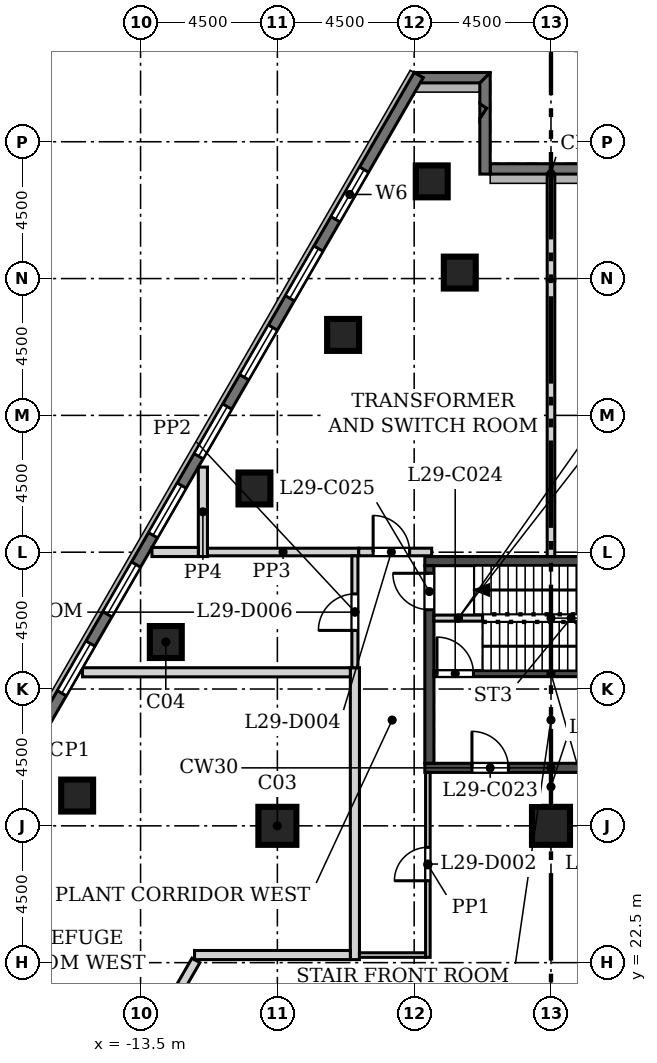
"""IFC4 building model, lengths in metres.
Left out: names, types, materials, properties, quantities, classifications, styles, units other than length and angle.
Written with IfcOpenShell. Run it as: python <this file> out.ifc"""

import sys

from ifc_helpers import new_model, si_unit, direction, frame, frame_2d, origin, origin_2d, place, context, subcontext, project, spatial, polyline, rectangle, outline, extrude, element, fill, save


model = new_model("IFC4")
c1 = context("Model", 3, precision=1e-05, world=origin(), true_north=direction((0.0, 1.0)))
c2 = subcontext(c1, "Body", "Model", "MODEL_VIEW")
j1 = project(units=[si_unit("LENGTHUNIT", "METRE"), si_unit("PLANEANGLEUNIT", "RADIAN")], contexts=[c1])
p1 = place(None, origin())
s1 = spatial("IfcSite", under=j1, at=p1, CompositionType="ELEMENT")
p2 = place(p1, origin())
s2 = spatial("IfcBuilding", under=s1, at=p2, CompositionType="ELEMENT")
p3 = place(p2, frame((0.0, 0.0, 132.1)))
s3 = spatial("IfcBuildingStorey", under=s2, at=p3, CompositionType="ELEMENT", Elevation=132.1)
for number, where, z_axis, x_axis in (
    (1, (-3.0, 45.197, 0.0), (0.0, 0.0, 1.0), (1.0, 0.0, 0.0)),
    (2, (-3.923, 48.197, 0.0), (0.0, 0.0, 1.0), (1.0, 0.0, 0.0)),
    (3, (-6.838, 43.146, 0.0), (0.0, 0.0, 1.0), (1.0, 0.0, 0.0)),
    (4, (-9.754, 38.096, 0.0), (0.0, 0.0, 1.0), (1.0, 0.0, 0.0)),
    (5, (-12.67, 33.046, 0.0), (0.0, 0.0, 1.0), (1.0, 0.0, 0.0)),
    (6, (-15.586, 27.995, 0.0), (0.0, 0.0, 1.0), (1.0, 0.0, 0.0)),
):
    element("IfcColumn", number, at=place(p3, frame(where, z_axis=z_axis, x_axis=x_axis)), inside=s3, PredefinedType="COLUMN", context=c2, shape_type="SweptSolid", body=[
        extrude(rectangle(XDim=1.05, YDim=1.05, at=origin_2d()), origin(), (0.0, 0.0, 1.0), 5.4),
    ])
for number, where, z_axis, x_axis in (
    (7, (-9.0, 27.0, 0.0), (0.0, 0.0, 1.0), (1.0, 0.0, 0.0)),
    (8, (0.0, 27.0, 0.0), (0.0, 0.0, 1.0), (1.0, 0.0, 0.0)),
):
    element("IfcColumn", number, at=place(p3, frame(where, z_axis=z_axis, x_axis=x_axis)), inside=s3, PredefinedType="COLUMN", context=c2, shape_type="SweptSolid", body=[
        extrude(rectangle(XDim=1.25, YDim=1.25, at=origin_2d()), origin(), (0.0, 0.0, 1.0), 5.4),
    ])
p4 = place(p3, frame((2.0, 48.607, 0.0), z_axis=(0.0, 0.0, 1.0), x_axis=(-1.0, 0.0, 0.0)))
e9 = element("IfcWall", 9, at=p4, inside=s3, PredefinedType="SOLIDWALL", context=c2, shape_type="SweptSolid", body=[
    extrude(rectangle(XDim=4.0, YDim=0.34, at=frame_2d((2.0, 0.0))), origin(), (0.0, 0.0, 1.0), 5.0),
])
p5 = place(p3, origin())
e10 = element("IfcWall", 10, at=p5, inside=s3, PredefinedType="SOLIDWALL", context=c2, shape_type="SweptSolid", body=[
    extrude(outline(polyline([(-2.341, 50.752), (-2.114, 50.604), (-2.341, 50.256), (-2.341, 50.752)])), origin(), (0.0, 0.0, 1.0), 4.4),
])
p6 = place(p3, origin())
e11 = element("IfcWall", 11, at=p6, inside=s3, PredefinedType="SOLIDWALL", context=c2, shape_type="SweptSolid", body=[
    extrude(outline(polyline([(-2.0, 48.436), (-2.341, 48.436), (-2.341, 50.256), (-2.114, 50.604), (-2.341, 50.752), (-2.341, 51.437), (-2.0, 51.778), (-2.0, 51.778), (-2.0, 48.436)])), origin(), (0.0, 0.0, 1.0), 5.0),
])
p7 = place(p3, origin())
e12 = element("IfcWall", 12, at=p7, inside=s3, PredefinedType="SOLIDWALL", context=c2, shape_type="SweptSolid", body=[
    extrude(outline(polyline([(-4.305, 51.436), (-4.206, 51.606), (-4.501, 51.777), (-4.501, 51.777), (-1.999, 51.777), (-1.999, 51.777), (-2.34, 51.436), (-4.305, 51.436)])), origin(), (0.0, 0.0, 1.0), 5.0),
])
p8 = place(p3, frame((-4.353, 51.692, 0.0), z_axis=(0.0, 0.0, 1.0), x_axis=(-0.500000700546, -0.866024999324, 0.0)))
e13 = element("IfcWall", 13, at=p8, inside=s3, PredefinedType="SOLIDWALL", context=c2, shape_type="SweptSolid", body=[
    extrude(rectangle(XDim=50.787, YDim=0.34, at=frame_2d((25.393, 0.0))), origin(), (0.0, 0.0, 1.0), 5.0),
])
p9 = place(p8, frame((3.59, 0.0, 0.9)))
e14 = element("IfcOpeningElement", 14, at=p9, cuts=e13, PredefinedType="OPENING", context=c2, shape_type="SweptSolid", body=[
    extrude(rectangle(XDim=1.885, YDim=3.0, at=frame_2d((0.942, 1.5))), frame((0.0, 0.18, 0.0), z_axis=(0.0, -1.0, 0.0), x_axis=(1.0, 0.0, 0.0)), (0.0, 0.0, 1.0), 0.36),
])
p10 = place(p8, frame((6.59, 0.0, 0.9)))
e15 = element("IfcOpeningElement", 15, at=p10, cuts=e13, PredefinedType="OPENING", context=c2, shape_type="SweptSolid", body=[
    extrude(rectangle(XDim=1.885, YDim=3.0, at=frame_2d((0.942, 1.5))), frame((0.0, 0.18, 0.0), z_axis=(0.0, -1.0, 0.0), x_axis=(1.0, 0.0, 0.0)), (0.0, 0.0, 1.0), 0.36),
])
p11 = place(p8, frame((9.59, 0.0, 0.9)))
e16 = element("IfcOpeningElement", 16, at=p11, cuts=e13, PredefinedType="OPENING", context=c2, shape_type="SweptSolid", body=[
    extrude(rectangle(XDim=1.885, YDim=3.0, at=frame_2d((0.942, 1.5))), frame((0.0, 0.18, 0.0), z_axis=(0.0, -1.0, 0.0), x_axis=(1.0, 0.0, 0.0)), (0.0, 0.0, 1.0), 0.36),
])
p12 = place(p8, frame((12.59, 0.0, 0.9)))
e17 = element("IfcOpeningElement", 17, at=p12, cuts=e13, PredefinedType="OPENING", context=c2, shape_type="SweptSolid", body=[
    extrude(rectangle(XDim=1.885, YDim=3.0, at=frame_2d((0.942, 1.5))), frame((0.0, 0.18, 0.0), z_axis=(0.0, -1.0, 0.0), x_axis=(1.0, 0.0, 0.0)), (0.0, 0.0, 1.0), 0.36),
])
p13 = place(p8, frame((15.59, 0.0, 0.9)))
e18 = element("IfcOpeningElement", 18, at=p13, cuts=e13, PredefinedType="OPENING", context=c2, shape_type="SweptSolid", body=[
    extrude(rectangle(XDim=1.885, YDim=3.0, at=frame_2d((0.942, 1.5))), frame((0.0, 0.18, 0.0), z_axis=(0.0, -1.0, 0.0), x_axis=(1.0, 0.0, 0.0)), (0.0, 0.0, 1.0), 0.36),
])
p14 = place(p8, frame((18.59, 0.0, 0.9)))
e19 = element("IfcOpeningElement", 19, at=p14, cuts=e13, PredefinedType="OPENING", context=c2, shape_type="SweptSolid", body=[
    extrude(rectangle(XDim=1.885, YDim=3.0, at=frame_2d((0.942, 1.5))), frame((0.0, 0.18, 0.0), z_axis=(0.0, -1.0, 0.0), x_axis=(1.0, 0.0, 0.0)), (0.0, 0.0, 1.0), 0.36),
])
p15 = place(p8, frame((21.59, 0.0, 0.9)))
e20 = element("IfcOpeningElement", 20, at=p15, cuts=e13, PredefinedType="OPENING", context=c2, shape_type="SweptSolid", body=[
    extrude(rectangle(XDim=1.885, YDim=3.0, at=frame_2d((0.942, 1.5))), frame((0.0, 0.18, 0.0), z_axis=(0.0, -1.0, 0.0), x_axis=(1.0, 0.0, 0.0)), (0.0, 0.0, 1.0), 0.36),
])
p16 = place(p8, frame((24.59, 0.0, 0.9)))
e21 = element("IfcOpeningElement", 21, at=p16, cuts=e13, PredefinedType="OPENING", context=c2, shape_type="SweptSolid", body=[
    extrude(rectangle(XDim=1.885, YDim=3.0, at=frame_2d((0.942, 1.5))), frame((0.0, 0.18, 0.0), z_axis=(0.0, -1.0, 0.0), x_axis=(1.0, 0.0, 0.0)), (0.0, 0.0, 1.0), 0.36),
])
p17 = place(p8, frame((27.59, 0.0, 0.9)))
e22 = element("IfcOpeningElement", 22, at=p17, cuts=e13, PredefinedType="OPENING", context=c2, shape_type="SweptSolid", body=[
    extrude(rectangle(XDim=1.885, YDim=3.0, at=frame_2d((0.942, 1.5))), frame((0.0, 0.18, 0.0), z_axis=(0.0, -1.0, 0.0), x_axis=(1.0, 0.0, 0.0)), (0.0, 0.0, 1.0), 0.36),
])
p18 = place(p8, frame((30.59, 0.0, 0.9)))
e23 = element("IfcOpeningElement", 23, at=p18, cuts=e13, PredefinedType="OPENING", context=c2, shape_type="SweptSolid", body=[
    extrude(rectangle(XDim=1.885, YDim=3.0, at=frame_2d((0.942, 1.5))), frame((0.0, 0.18, 0.0), z_axis=(0.0, -1.0, 0.0), x_axis=(1.0, 0.0, 0.0)), (0.0, 0.0, 1.0), 0.36),
])
p19 = place(p8, frame((33.59, 0.0, 0.9)))
e24 = element("IfcOpeningElement", 24, at=p19, cuts=e13, PredefinedType="OPENING", context=c2, shape_type="SweptSolid", body=[
    extrude(rectangle(XDim=1.885, YDim=3.0, at=frame_2d((0.942, 1.5))), frame((0.0, 0.18, 0.0), z_axis=(0.0, -1.0, 0.0), x_axis=(1.0, 0.0, 0.0)), (0.0, 0.0, 1.0), 0.36),
])
p20 = place(p8, frame((36.59, 0.0, 0.9)))
e25 = element("IfcOpeningElement", 25, at=p20, cuts=e13, PredefinedType="OPENING", context=c2, shape_type="SweptSolid", body=[
    extrude(rectangle(XDim=1.885, YDim=3.0, at=frame_2d((0.942, 1.5))), frame((0.0, 0.18, 0.0), z_axis=(0.0, -1.0, 0.0), x_axis=(1.0, 0.0, 0.0)), (0.0, 0.0, 1.0), 0.36),
])
p21 = place(p8, frame((39.59, 0.0, 0.9)))
e26 = element("IfcOpeningElement", 26, at=p21, cuts=e13, PredefinedType="OPENING", context=c2, shape_type="SweptSolid", body=[
    extrude(rectangle(XDim=1.885, YDim=3.0, at=frame_2d((0.942, 1.5))), frame((0.0, 0.18, 0.0), z_axis=(0.0, -1.0, 0.0), x_axis=(1.0, 0.0, 0.0)), (0.0, 0.0, 1.0), 0.36),
])
p22 = place(p8, frame((42.59, 0.0, 0.9)))
e27 = element("IfcOpeningElement", 27, at=p22, cuts=e13, PredefinedType="OPENING", context=c2, shape_type="SweptSolid", body=[
    extrude(rectangle(XDim=1.885, YDim=3.0, at=frame_2d((0.942, 1.5))), frame((0.0, 0.18, 0.0), z_axis=(0.0, -1.0, 0.0), x_axis=(1.0, 0.0, 0.0)), (0.0, 0.0, 1.0), 0.36),
])
p23 = place(p8, frame((45.59, 0.0, 0.9)))
e28 = element("IfcOpeningElement", 28, at=p23, cuts=e13, PredefinedType="OPENING", context=c2, shape_type="SweptSolid", body=[
    extrude(rectangle(XDim=1.885, YDim=3.0, at=frame_2d((0.942, 1.5))), frame((0.0, 0.18, 0.0), z_axis=(0.0, -1.0, 0.0), x_axis=(1.0, 0.0, 0.0)), (0.0, 0.0, 1.0), 0.36),
])
p24 = place(p3, frame((-4.15, 28.907, -0.4), z_axis=(0.0, 0.0, 1.0), x_axis=(1.0, 0.0, 0.0)))
e29 = element("IfcWall", 29, at=p24, inside=s3, PredefinedType="SOLIDWALL", context=c2, shape_type="SweptSolid", body=[
    extrude(rectangle(XDim=8.3, YDim=0.3, at=frame_2d((4.15, 0.0))), origin(), (0.0, 0.0, 1.0), 5.4),
])
p25 = place(p24, frame((1.55, 0.0, 0.4)))
e30 = element("IfcOpeningElement", 30, at=p25, cuts=e29, PredefinedType="OPENING", context=c2, shape_type="SweptSolid", body=[
    extrude(rectangle(XDim=1.2, YDim=2.1, at=frame_2d((0.6, 1.05))), frame((0.0, 0.16, 0.0), z_axis=(0.0, -1.0, 0.0), x_axis=(1.0, 0.0, 0.0)), (0.0, 0.0, 1.0), 0.32),
])
p26 = place(p3, frame((-4.15, 35.707, -0.4), z_axis=(0.0, 0.0, 1.0), x_axis=(1.0, 0.0, 0.0)))
e31 = element("IfcWall", 31, at=p26, inside=s3, PredefinedType="SOLIDWALL", context=c2, shape_type="SweptSolid", body=[
    extrude(rectangle(XDim=8.3, YDim=0.3, at=frame_2d((4.15, 0.0))), origin(), (0.0, 0.0, 1.0), 5.4),
])
p27 = place(p3, frame((-4.0, 29.057, -0.4), z_axis=(0.0, 0.0, 1.0), x_axis=(0.0, 1.0, 0.0)))
e32 = element("IfcWall", 32, at=p27, inside=s3, PredefinedType="SOLIDWALL", context=c2, shape_type="SweptSolid", body=[
    extrude(rectangle(XDim=6.5, YDim=0.3, at=frame_2d((3.25, 0.0))), origin(), (0.0, 0.0, 1.0), 5.4),
])
p28 = place(p27, frame((5.05, 0.0, 0.4)))
e33 = element("IfcOpeningElement", 33, at=p28, cuts=e32, PredefinedType="OPENING", context=c2, shape_type="SweptSolid", body=[
    extrude(rectangle(XDim=1.2, YDim=2.1, at=frame_2d((0.6, 1.05))), frame((0.0, 0.16, 0.0), z_axis=(0.0, -1.0, 0.0), x_axis=(1.0, 0.0, 0.0)), (0.0, 0.0, 1.0), 0.32),
])
p29 = place(p3, frame((-3.85, 32.007, -0.4), z_axis=(0.0, 0.0, 1.0), x_axis=(1.0, 0.0, 0.0)))
e34 = element("IfcWall", 34, at=p29, inside=s3, PredefinedType="SOLIDWALL", context=c2, shape_type="SweptSolid", body=[
    extrude(rectangle(XDim=7.7, YDim=0.2, at=frame_2d((3.85, 0.0))), origin(), (0.0, 0.0, 1.0), 5.4),
])
p30 = place(p29, frame((0.1, 0.0, 0.4)))
e35 = element("IfcOpeningElement", 35, at=p30, cuts=e34, PredefinedType="OPENING", context=c2, shape_type="SweptSolid", body=[
    extrude(rectangle(XDim=1.2, YDim=2.1, at=frame_2d((0.6, 1.05))), frame((0.0, 0.11, 0.0), z_axis=(0.0, -1.0, 0.0), x_axis=(1.0, 0.0, 0.0)), (0.0, 0.0, 1.0), 0.22),
])
p31 = place(p3, frame((-3.85, 33.832, 0.0), z_axis=(0.0, 0.0, 1.0), x_axis=(1.0, 0.0, 0.0)))
e36 = element("IfcWall", 36, at=p31, inside=s3, PredefinedType="SOLIDWALL", context=c2, shape_type="SweptSolid", body=[
    extrude(rectangle(XDim=1.6, YDim=0.2, at=frame_2d((0.8, 0.0))), origin(), (0.0, 0.0, 1.0), 5.0),
])
p32 = place(p3, frame((0.0, 48.437, 0.0), z_axis=(0.0, 0.0, 1.0), x_axis=(0.0, -1.0, 0.0)))
e37 = element("IfcWall", 37, at=p32, inside=s3, PredefinedType="SOLIDWALL", context=c2, shape_type="SweptSolid", body=[
    extrude(rectangle(XDim=3.49, YDim=0.25, at=frame_2d((1.745, 0.0))), origin(), (0.0, 0.0, 1.0), 5.0),
])
p33 = place(p3, frame((-17.626, 12.272, 0.0), z_axis=(0.0, 0.0, 1.0), x_axis=(0.500008476462, 0.866020509841, 0.0)))
e38 = element("IfcWall", 38, at=p33, inside=s3, PredefinedType="SOLIDWALL", context=c2, shape_type="SweptSolid", body=[
    extrude(rectangle(XDim=11.896, YDim=0.3, at=frame_2d((5.948, 0.0))), origin(), (0.0, 0.0, 1.0), 5.0),
])
p34 = place(p3, frame((-6.45, 22.6, 0.0), z_axis=(0.0, 0.0, 1.0), x_axis=(0.0, 1.0, 0.0)))
e39 = element("IfcWall", 39, at=p34, inside=s3, PredefinedType="SOLIDWALL", context=c2, shape_type="SweptSolid", body=[
    extrude(rectangle(XDim=9.6, YDim=0.3, at=frame_2d((4.8, 0.0))), origin(), (0.0, 0.0, 1.0), 5.0),
])
p35 = place(p3, frame((-15.41, 32.05, 0.0), z_axis=(0.0, 0.0, 1.0), x_axis=(1.0, 0.0, 0.0)))
e40 = element("IfcWall", 40, at=p35, inside=s3, PredefinedType="SOLIDWALL", context=c2, shape_type="SweptSolid", body=[
    extrude(rectangle(XDim=8.81, YDim=0.3, at=frame_2d((4.405, 0.0))), origin(), (0.0, 0.0, 1.0), 5.0),
])
p36 = place(p3, frame((-4.05, 22.675, 0.0), z_axis=(0.0, 0.0, 1.0), x_axis=(0.0, 1.0, 0.0)))
e41 = element("IfcWall", 41, at=p36, inside=s3, PredefinedType="PARTITIONING", context=c2, shape_type="SweptSolid", body=[
    extrude(rectangle(XDim=6.082, YDim=0.15, at=frame_2d((3.041, 0.0))), origin(), (0.0, 0.0, 1.0), 5.0),
])
p37 = place(p36, frame((2.519, 0.0, 0.0)))
e42 = element("IfcOpeningElement", 42, at=p37, cuts=e41, PredefinedType="OPENING", context=c2, shape_type="SweptSolid", body=[
    extrude(rectangle(XDim=1.1, YDim=2.1, at=frame_2d((0.55, 1.05))), frame((0.0, 0.085, 0.0), z_axis=(0.0, -1.0, 0.0), x_axis=(1.0, 0.0, 0.0)), (0.0, 0.0, 1.0), 0.17),
])
p38 = place(p3, frame((-11.725, 22.75, 0.0), z_axis=(0.0, 0.0, 1.0), x_axis=(1.0, 0.0, 0.0)))
e43 = element("IfcWall", 43, at=p38, inside=s3, PredefinedType="SOLIDWALL", context=c2, shape_type="SweptSolid", body=[
    extrude(rectangle(XDim=5.125, YDim=0.3, at=frame_2d((2.562, 0.0))), origin(), (0.0, 0.0, 1.0), 5.0),
])
p39 = place(p3, frame((-6.325, 36.006, 0.0), z_axis=(0.0, 0.0, 1.0), x_axis=(-1.0, 0.0, 0.0)))
e44 = element("IfcWall", 44, at=p39, inside=s3, PredefinedType="SOLIDWALL", context=c2, shape_type="SweptSolid", body=[
    extrude(rectangle(XDim=4.975, YDim=0.25, at=frame_2d((2.488, 0.0))), origin(), (0.0, 0.0, 1.0), 4.1),
])
p40 = place(p3, frame((-6.45, 32.2, 0.0), z_axis=(0.0, 0.0, 1.0), x_axis=(0.0, 1.0, 0.0)))
e45 = element("IfcWall", 45, at=p40, inside=s3, PredefinedType="PARTITIONING", context=c2, shape_type="SweptSolid", body=[
    extrude(rectangle(XDim=3.681, YDim=0.2, at=frame_2d((1.841, 0.0))), origin(), (0.0, 0.0, 1.0), 5.0),
])
p41 = place(p40, frame((1.228, 0.0, 0.0)))
e46 = element("IfcOpeningElement", 46, at=p41, cuts=e45, PredefinedType="OPENING", context=c2, shape_type="SweptSolid", body=[
    extrude(rectangle(XDim=1.2, YDim=2.1, at=frame_2d((0.6, 1.05))), frame((0.0, 0.11, 0.0), z_axis=(0.0, -1.0, 0.0), x_axis=(1.0, 0.0, 0.0)), (0.0, 0.0, 1.0), 0.22),
])
p42 = place(p3, frame((-11.45, 35.857, 0.0), z_axis=(0.0, 0.0, 1.0), x_axis=(0.0, 1.0, 0.0)))
e47 = element("IfcWall", 47, at=p42, inside=s3, PredefinedType="SOLIDWALL", context=c2, shape_type="SweptSolid", body=[
    extrude(rectangle(XDim=2.942, YDim=0.3, at=frame_2d((1.471, 0.0))), origin(), (0.0, 0.0, 1.0), 5.0),
])
p43 = place(p3, frame((-6.325, 36.007, 0.0), z_axis=(0.0, 0.0, 1.0), x_axis=(1.0, 0.0, 0.0)))
e48 = element("IfcWall", 48, at=p43, inside=s3, PredefinedType="SOLIDWALL", context=c2, shape_type="SweptSolid", body=[
    extrude(rectangle(XDim=2.4, YDim=0.25, at=frame_2d((1.2, 0.0))), origin(), (0.0, 0.0, 1.0), 4.1),
])
p44 = place(p43, frame((0.475, 0.0, 0.0)))
e49 = element("IfcOpeningElement", 49, at=p44, cuts=e48, PredefinedType="OPENING", context=c2, shape_type="SweptSolid", body=[
    extrude(rectangle(XDim=1.2, YDim=2.1, at=frame_2d((0.6, 1.05))), frame((0.0, 0.135, 0.0), z_axis=(0.0, -1.0, 0.0), x_axis=(1.0, 0.0, 0.0)), (0.0, 0.0, 1.0), 0.27),
])
p45 = place(p3, frame((-6.3, 22.75, 0.0), z_axis=(0.0, 0.0, 1.0), x_axis=(1.0, 0.0, 0.0)))
e50 = element("IfcWall", 50, at=p45, inside=s3, PredefinedType="PARTITIONING", context=c2, shape_type="SweptSolid", body=[
    extrude(rectangle(XDim=2.175, YDim=0.15, at=frame_2d((1.087, 0.0))), origin(), (0.0, 0.0, 1.0), 5.0),
])
p46 = place(p3, frame((-11.6, 36.007, 0.0), z_axis=(0.0, 0.0, 1.0), x_axis=(-1.0, 0.0, 0.0)))
e51 = element("IfcWall", 51, at=p46, inside=s3, PredefinedType="SOLIDWALL", context=c2, shape_type="SweptSolid", body=[
    extrude(rectangle(XDim=1.525, YDim=0.3, at=frame_2d((0.763, 0.0))), origin(), (0.0, 0.0, 1.0), 5.0),
])
p47 = place(p3, frame((0.0, 44.947, 0.0), z_axis=(0.0, 0.0, 1.0), x_axis=(0.0, -1.0, 0.0)))
e52 = element("IfcWall", 52, at=p47, inside=s3, PredefinedType="SOLIDWALL", context=c2, shape_type="SweptSolid", body=[
    extrude(rectangle(XDim=9.09, YDim=0.25, at=frame_2d((4.545, 0.0))), origin(), (0.0, 0.0, 1.0), 4.25),
])
p48 = place(p9, origin())
e53 = element("IfcWindow", 53, at=p48, inside=s3, PartitioningType="SINGLE_PANEL", PredefinedType="WINDOW", context=c2, shape_type="SweptSolid", body=[
    extrude(rectangle(XDim=1.885, YDim=3.0, at=frame_2d((0.942, 1.5))), frame((0.0, 0.11, 0.0), z_axis=(0.0, -1.0, 0.0), x_axis=(1.0, 0.0, 0.0)), (0.0, 0.0, 1.0), 0.06),
])
fill(e14, e53)
p49 = place(p10, origin())
e54 = element("IfcWindow", 54, at=p49, inside=s3, PartitioningType="SINGLE_PANEL", PredefinedType="WINDOW", context=c2, shape_type="SweptSolid", body=[
    extrude(rectangle(XDim=1.885, YDim=3.0, at=frame_2d((0.942, 1.5))), frame((0.0, 0.11, 0.0), z_axis=(0.0, -1.0, 0.0), x_axis=(1.0, 0.0, 0.0)), (0.0, 0.0, 1.0), 0.06),
])
fill(e15, e54)
p50 = place(p11, origin())
e55 = element("IfcWindow", 55, at=p50, inside=s3, PartitioningType="SINGLE_PANEL", PredefinedType="WINDOW", context=c2, shape_type="SweptSolid", body=[
    extrude(rectangle(XDim=1.885, YDim=3.0, at=frame_2d((0.942, 1.5))), frame((0.0, 0.11, 0.0), z_axis=(0.0, -1.0, 0.0), x_axis=(1.0, 0.0, 0.0)), (0.0, 0.0, 1.0), 0.06),
])
fill(e16, e55)
p51 = place(p12, origin())
e56 = element("IfcWindow", 56, at=p51, inside=s3, PartitioningType="SINGLE_PANEL", PredefinedType="WINDOW", context=c2, shape_type="SweptSolid", body=[
    extrude(rectangle(XDim=1.885, YDim=3.0, at=frame_2d((0.942, 1.5))), frame((0.0, 0.11, 0.0), z_axis=(0.0, -1.0, 0.0), x_axis=(1.0, 0.0, 0.0)), (0.0, 0.0, 1.0), 0.06),
])
fill(e17, e56)
p52 = place(p13, origin())
e57 = element("IfcWindow", 57, at=p52, inside=s3, PartitioningType="SINGLE_PANEL", PredefinedType="WINDOW", context=c2, shape_type="SweptSolid", body=[
    extrude(rectangle(XDim=1.885, YDim=3.0, at=frame_2d((0.942, 1.5))), frame((0.0, 0.11, 0.0), z_axis=(0.0, -1.0, 0.0), x_axis=(1.0, 0.0, 0.0)), (0.0, 0.0, 1.0), 0.06),
])
fill(e18, e57)
p53 = place(p14, origin())
e58 = element("IfcWindow", 58, at=p53, inside=s3, PartitioningType="SINGLE_PANEL", PredefinedType="WINDOW", context=c2, shape_type="SweptSolid", body=[
    extrude(rectangle(XDim=1.885, YDim=3.0, at=frame_2d((0.942, 1.5))), frame((0.0, 0.11, 0.0), z_axis=(0.0, -1.0, 0.0), x_axis=(1.0, 0.0, 0.0)), (0.0, 0.0, 1.0), 0.06),
])
fill(e19, e58)
p54 = place(p15, origin())
e59 = element("IfcWindow", 59, at=p54, inside=s3, PartitioningType="SINGLE_PANEL", PredefinedType="WINDOW", context=c2, shape_type="SweptSolid", body=[
    extrude(rectangle(XDim=1.885, YDim=3.0, at=frame_2d((0.942, 1.5))), frame((0.0, 0.11, 0.0), z_axis=(0.0, -1.0, 0.0), x_axis=(1.0, 0.0, 0.0)), (0.0, 0.0, 1.0), 0.06),
])
fill(e20, e59)
p55 = place(p25, origin())
e60 = element("IfcDoor", 60, at=p55, inside=s3, OperationType="SINGLE_SWING_LEFT", PredefinedType="DOOR", context=c2, shape_type="SweptSolid", body=[
    extrude(rectangle(XDim=1.2, YDim=2.1, at=frame_2d((0.6, 1.05))), frame((0.0, 0.025, 0.0), z_axis=(0.0, -1.0, 0.0), x_axis=(1.0, 0.0, 0.0)), (0.0, 0.0, 1.0), 0.05),
])
fill(e30, e60)
p56 = place(p30, origin())
e61 = element("IfcDoor", 61, at=p56, inside=s3, OperationType="SINGLE_SWING_LEFT", PredefinedType="DOOR", context=c2, shape_type="SweptSolid", body=[
    extrude(rectangle(XDim=1.2, YDim=2.1, at=frame_2d((0.6, 1.05))), frame((0.0, 0.025, 0.0), z_axis=(0.0, -1.0, 0.0), x_axis=(1.0, 0.0, 0.0)), (0.0, 0.0, 1.0), 0.05),
])
fill(e35, e61)
p57 = place(p28, origin())
e62 = element("IfcDoor", 62, at=p57, inside=s3, OperationType="SINGLE_SWING_RIGHT", PredefinedType="DOOR", context=c2, shape_type="SweptSolid", body=[
    extrude(rectangle(XDim=1.2, YDim=2.1, at=frame_2d((0.6, 1.05))), frame((0.0, 0.025, 0.0), z_axis=(0.0, -1.0, 0.0), x_axis=(1.0, 0.0, 0.0)), (0.0, 0.0, 1.0), 0.05),
])
fill(e33, e62)
p58 = place(p37, origin())
e63 = element("IfcDoor", 63, at=p58, inside=s3, OperationType="SINGLE_SWING_LEFT", PredefinedType="DOOR", context=c2, shape_type="SweptSolid", body=[
    extrude(rectangle(XDim=1.1, YDim=2.1, at=frame_2d((0.55, 1.05))), frame((0.0, 0.025, 0.0), z_axis=(0.0, -1.0, 0.0), x_axis=(1.0, 0.0, 0.0)), (0.0, 0.0, 1.0), 0.05),
])
fill(e42, e63)
p59 = place(p44, origin())
e64 = element("IfcDoor", 64, at=p59, inside=s3, OperationType="SINGLE_SWING_LEFT", PredefinedType="DOOR", context=c2, shape_type="SweptSolid", body=[
    extrude(rectangle(XDim=1.2, YDim=2.1, at=frame_2d((0.6, 1.05))), frame((0.0, 0.025, 0.0), z_axis=(0.0, -1.0, 0.0), x_axis=(1.0, 0.0, 0.0)), (0.0, 0.0, 1.0), 0.05),
])
fill(e49, e64)
p60 = place(p41, origin())
e65 = element("IfcDoor", 65, at=p60, inside=s3, OperationType="SINGLE_SWING_LEFT", PredefinedType="DOOR", context=c2, shape_type="SweptSolid", body=[
    extrude(rectangle(XDim=1.2, YDim=2.1, at=frame_2d((0.6, 1.05))), frame((0.0, 0.025, 0.0), z_axis=(0.0, -1.0, 0.0), x_axis=(1.0, 0.0, 0.0)), (0.0, 0.0, 1.0), 0.05),
])
fill(e46, e65)
save(model, sys.argv[1])
